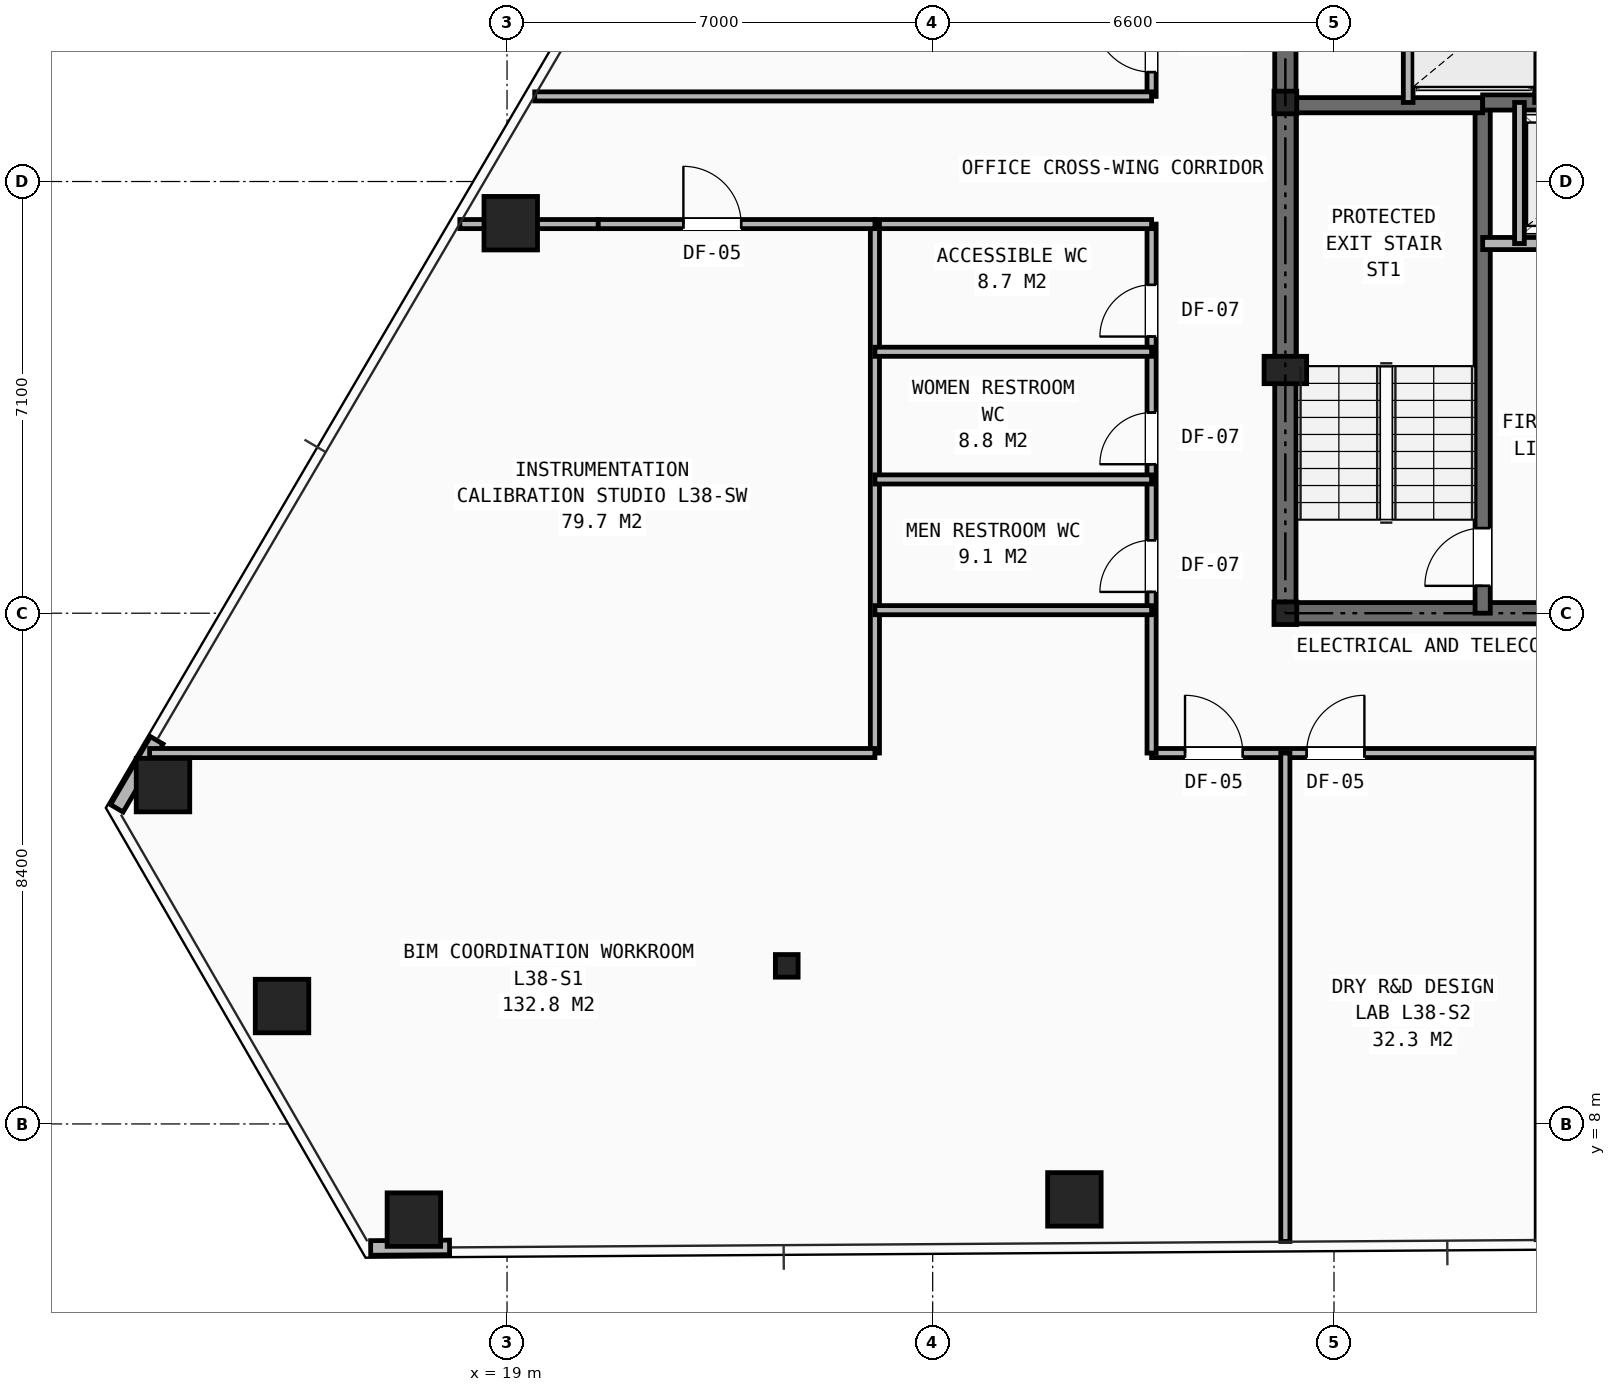
"""IFC4 building model, lengths in metres.
Left out: names, types, materials, properties, quantities, classifications, styles, units other than length and angle.
Written with IfcOpenShell. Run it as: python <this file> out.ifc"""

import sys

from ifc_helpers import new_model, si_unit, direction, frame, frame_2d, origin, origin_2d, place, context, subcontext, project, spatial, rectangle, hollow_rectangle, i_section, extrude, element, fill, save


model = new_model("IFC4")
c1 = context("Model", 3, precision=1e-05, world=origin(), true_north=direction((0.0, 1.0)))
c2 = subcontext(c1, "Body", "Model", "MODEL_VIEW")
j1 = project(units=[si_unit("LENGTHUNIT", "METRE"), si_unit("PLANEANGLEUNIT", "RADIAN")], contexts=[c1])
p1 = place(None, origin())
s1 = spatial("IfcSite", under=j1, at=p1, CompositionType="ELEMENT")
p2 = place(p1, origin())
s2 = spatial("IfcBuilding", under=s1, at=p2, CompositionType="ELEMENT")
p3 = place(p2, frame((0.0, 0.0, 133.25)))
s3 = spatial("IfcBuildingStorey", under=s2, at=p3, CompositionType="ELEMENT", Elevation=133.25)
for number, where, z_axis, x_axis in (
    (1, (31.8, 16.4, 0.0), (0.0, 0.0, 1.0), (1.0, 0.0, 0.0)),
    (2, (31.8, 24.8, 0.0), (0.0, 0.0, 1.0), (1.0, 0.0, 0.0)),
    (3, (23.6, 10.6, 0.0), (0.0, 0.0, 1.0), (1.0, 0.0, 0.0)),
):
    element("IfcColumn", number, at=place(p3, frame(where, z_axis=z_axis, x_axis=x_axis)), inside=s3, PredefinedType="COLUMN", context=c2, shape_type="SweptSolid", body=[
        extrude(i_section(OverallWidth=0.374, OverallDepth=0.372, WebThickness=0.016, FlangeThickness=0.026, at=origin_2d()), origin(), (0.0, 0.0, 1.0), 3.45),
    ])
p4 = place(p3, frame((31.8, 20.4, 0.0), z_axis=(0.0, 0.0, 1.0), x_axis=(1.0, 0.0, 0.0)))
e4 = element("IfcColumn", 4, at=p4, inside=s3, PredefinedType="PILASTER", context=c2, shape_type="SweptSolid", body=[
    extrude(rectangle(XDim=0.7, YDim=0.45, at=origin_2d()), origin(), (0.0, 0.0, 1.0), 3.45),
])
for number, where, z_axis, x_axis in (
    (5, (19.061, 22.814, 0.0), (0.0, 0.0, 1.0), (1.0, 0.0, 0.0)),
    (6, (13.342, 13.573, 0.0), (0.0, 0.0, 1.0), (1.0, 0.0, 0.0)),
    (7, (15.3, 9.939, 0.0), (0.0, 0.0, 1.0), (1.0, 0.0, 0.0)),
    (8, (17.468, 6.427, 0.0), (0.0, 0.0, 1.0), (1.0, 0.0, 0.0)),
    (9, (28.331, 6.759, 0.0), (0.0, 0.0, 1.0), (1.0, 0.0, 0.0)),
):
    element("IfcColumn", number, at=place(p3, frame(where, z_axis=z_axis, x_axis=x_axis)), inside=s3, PredefinedType="COLUMN", context=c2, shape_type="SweptSolid", body=[
        extrude(hollow_rectangle(XDim=0.88, YDim=0.88, WallThickness=0.06, at=origin_2d()), origin(), (0.0, 0.0, 1.0), 3.45),
    ])
for number, where, z_axis, x_axis in (
    (10, (13.239, 14.31, 0.0), (0.0, 0.0, 1.0), (-0.506, -0.863, 0.0)),
    (11, (16.757, 5.961, 0.0), (0.0, 0.0, 1.0), (1.0, 0.007, 0.0)),
):
    element("IfcWall", number, at=place(p3, frame(where, z_axis=z_axis, x_axis=x_axis)), inside=s3, PredefinedType="SHEAR", context=c2, shape_type="SweptSolid", body=[
        extrude(rectangle(XDim=1.298, YDim=0.24, at=frame_2d((0.649, 0.0))), origin(), (0.0, 0.0, 1.0), 2.583),
    ])
p5 = place(p3, frame((31.8, 16.4, 0.0), z_axis=(0.0, 0.0, 1.0), x_axis=(1.0, 0.0, 0.0)))
e12 = element("IfcWall", 12, at=p5, inside=s3, PredefinedType="SHEAR", context=c2, shape_type="SweptSolid", body=[
    extrude(rectangle(XDim=16.4, YDim=0.35, at=frame_2d((8.2, 0.0))), origin(), (0.0, 0.0, 1.0), 3.21),
])
p6 = place(p5, frame((7.75, 0.0, 0.0)))
e13 = element("IfcOpeningElement", 13, at=p6, cuts=e12, PredefinedType="OPENING", context=c2, shape_type="SweptSolid", body=[
    extrude(rectangle(XDim=0.9, YDim=2.1, at=frame_2d((0.45, 1.05))), frame((0.0, 0.185, 0.0), z_axis=(0.0, -1.0, 0.0), x_axis=(1.0, 0.0, 0.0)), (0.0, 0.0, 1.0), 0.37),
])
p7 = place(p5, frame((4.2, 0.0, 0.0)))
e14 = element("IfcOpeningElement", 14, at=p7, cuts=e12, PredefinedType="OPENING", context=c2, shape_type="SweptSolid", body=[
    extrude(rectangle(XDim=0.95, YDim=2.1, at=frame_2d((0.475, 1.05))), frame((0.0, 0.185, 0.0), z_axis=(0.0, -1.0, 0.0), x_axis=(1.0, 0.0, 0.0)), (0.0, 0.0, 1.0), 0.37),
])
p8 = place(p5, frame((10.6, 0.0, 0.0)))
e15 = element("IfcOpeningElement", 15, at=p8, cuts=e12, PredefinedType="OPENING", context=c2, shape_type="SweptSolid", body=[
    extrude(rectangle(XDim=0.95, YDim=2.1, at=frame_2d((0.475, 1.05))), frame((0.0, 0.185, 0.0), z_axis=(0.0, -1.0, 0.0), x_axis=(1.0, 0.0, 0.0)), (0.0, 0.0, 1.0), 0.37),
])
p9 = place(p3, frame((31.8, 16.4, 0.0), z_axis=(0.0, 0.0, 1.0), x_axis=(0.0, 1.0, 0.0)))
e16 = element("IfcWall", 16, at=p9, inside=s3, PredefinedType="SHEAR", context=c2, shape_type="SweptSolid", body=[
    extrude(rectangle(XDim=14.8, YDim=0.35, at=frame_2d((7.4, 0.0))), origin(), (0.0, 0.0, 1.0), 3.21),
])
p10 = place(p9, frame((11.0, 0.0, 0.0)))
e17 = element("IfcOpeningElement", 17, at=p10, cuts=e16, PredefinedType="OPENING", context=c2, shape_type="SweptSolid", body=[
    extrude(rectangle(XDim=1.1, YDim=2.15, at=frame_2d((0.55, 1.075))), frame((0.0, 0.185, 0.0), z_axis=(0.0, -1.0, 0.0), x_axis=(1.0, 0.0, 0.0)), (0.0, 0.0, 1.0), 0.37),
])
p11 = place(p3, frame((35.045, 16.4, 0.0), z_axis=(0.0, 0.0, 1.0), x_axis=(0.0, 1.0, 0.0)))
e18 = element("IfcWall", 18, at=p11, inside=s3, PredefinedType="SHEAR", context=c2, shape_type="SweptSolid", body=[
    extrude(rectangle(XDim=8.4, YDim=0.25, at=frame_2d((4.2, 0.0))), origin(), (0.0, 0.0, 1.0), 3.21),
])
p12 = place(p11, frame((0.45, 0.0, 0.0)))
e19 = element("IfcOpeningElement", 19, at=p12, cuts=e18, PredefinedType="OPENING", context=c2, shape_type="SweptSolid", body=[
    extrude(rectangle(XDim=0.95, YDim=2.1, at=frame_2d((0.475, 1.05))), frame((0.0, 0.135, 0.0), z_axis=(0.0, -1.0, 0.0), x_axis=(1.0, 0.0, 0.0)), (0.0, 0.0, 1.0), 0.27),
])
p13 = place(p3, frame((31.8, 24.755, 0.0), z_axis=(0.0, 0.0, 1.0), x_axis=(1.0, 0.0, 0.0)))
e20 = element("IfcWall", 20, at=p13, inside=s3, PredefinedType="SHEAR", context=c2, shape_type="SweptSolid", body=[
    extrude(rectangle(XDim=3.245, YDim=0.25, at=frame_2d((1.623, 0.0))), origin(), (0.0, 0.0, 1.0), 3.21),
])
p14 = place(p3, frame((35.045, 24.8, 0.0), z_axis=(0.0, 0.0, 1.0), x_axis=(1.0, 0.0, 0.0)))
e21 = element("IfcWall", 21, at=p14, inside=s3, PredefinedType="SHEAR", context=c2, shape_type="SweptSolid", body=[
    extrude(rectangle(XDim=9.91, YDim=0.25, at=frame_2d((4.955, 0.0))), origin(), (0.0, 0.0, 1.0), 3.21),
])
p15 = place(p3, frame((35.045, 22.48, 0.0), z_axis=(0.0, 0.0, 1.0), x_axis=(1.0, 0.0, 0.0)))
e22 = element("IfcWall", 22, at=p15, inside=s3, PredefinedType="SOLIDWALL", context=c2, shape_type="SweptSolid", body=[
    extrude(rectangle(XDim=9.91, YDim=0.2, at=frame_2d((4.955, 0.0))), origin(), (0.0, 0.0, 1.0), 3.21),
])
p16 = place(p15, frame((1.255, 0.0, 0.0)))
e23 = element("IfcOpeningElement", 23, at=p16, cuts=e22, PredefinedType="OPENING", context=c2, shape_type="SweptSolid", body=[
    extrude(rectangle(XDim=1.1, YDim=2.15, at=frame_2d((0.55, 1.075))), frame((0.0, 0.11, 0.0), z_axis=(0.0, -1.0, 0.0), x_axis=(1.0, 0.0, 0.0)), (0.0, 0.0, 1.0), 0.22),
])
p17 = place(p15, frame((7.555, 0.0, 0.0)))
e24 = element("IfcOpeningElement", 24, at=p17, cuts=e22, PredefinedType="OPENING", context=c2, shape_type="SweptSolid", body=[
    extrude(rectangle(XDim=1.1, YDim=2.15, at=frame_2d((0.55, 1.075))), frame((0.0, 0.11, 0.0), z_axis=(0.0, -1.0, 0.0), x_axis=(1.0, 0.0, 0.0)), (0.0, 0.0, 1.0), 0.22),
])
p18 = place(p15, frame((4.405, 0.0, 0.0)))
e25 = element("IfcOpeningElement", 25, at=p18, cuts=e22, PredefinedType="OPENING", context=c2, shape_type="SweptSolid", body=[
    extrude(rectangle(XDim=1.1, YDim=2.15, at=frame_2d((0.55, 1.075))), frame((0.0, 0.11, 0.0), z_axis=(0.0, -1.0, 0.0), x_axis=(1.0, 0.0, 0.0)), (0.0, 0.0, 1.0), 0.22),
])
p19 = place(p3, frame((35.65, 22.48, 0.0), z_axis=(0.0, 0.0, 1.0), x_axis=(0.0, 1.0, 0.0)))
e26 = element("IfcWall", 26, at=p19, inside=s3, PredefinedType="SOLIDWALL", context=c2, shape_type="SweptSolid", body=[
    extrude(rectangle(XDim=2.32, YDim=0.16, at=frame_2d((1.16, 0.0))), origin(), (0.0, 0.0, 1.0), 3.21),
])
for number, where, z_axis, x_axis in (
    (27, (33.82, 24.8, 0.0), (0.0, 0.0, 1.0), (0.0, 1.0, 0.0)),
    (28, (35.98, 24.8, 0.0), (0.0, 0.0, 1.0), (0.0, 1.0, 0.0)),
):
    element("IfcWall", number, at=place(p3, frame(where, z_axis=z_axis, x_axis=x_axis)), inside=s3, PredefinedType="SOLIDWALL", context=c2, shape_type="SweptSolid", body=[
        extrude(rectangle(XDim=2.08, YDim=0.16, at=frame_2d((1.04, 0.0))), origin(), (0.0, 0.0, 1.0), 3.21),
    ])
p20 = place(p3, frame((29.6, 14.1, 0.0), z_axis=(0.0, 0.0, 1.0), x_axis=(1.0, 0.0, 0.0)))
e29 = element("IfcWall", 29, at=p20, inside=s3, PredefinedType="PARTITIONING", context=c2, shape_type="SweptSolid", body=[
    extrude(rectangle(XDim=18.6, YDim=0.15, at=frame_2d((9.3, 0.0))), origin(), (0.0, 0.0, 1.0), 2.252),
])
p21 = place(p20, frame((0.55, 0.0, 0.0)))
e30 = element("IfcOpeningElement", 30, at=p21, cuts=e29, PredefinedType="OPENING", context=c2, shape_type="SweptSolid", body=[
    extrude(rectangle(XDim=0.95, YDim=2.1, at=frame_2d((0.475, 1.05))), frame((0.0, 0.085, 0.0), z_axis=(0.0, -1.0, 0.0), x_axis=(1.0, 0.0, 0.0)), (0.0, 0.0, 1.0), 0.17),
])
p22 = place(p20, frame((2.55, 0.0, 0.0)))
e31 = element("IfcOpeningElement", 31, at=p22, cuts=e29, PredefinedType="OPENING", context=c2, shape_type="SweptSolid", body=[
    extrude(rectangle(XDim=0.95, YDim=2.1, at=frame_2d((0.475, 1.05))), frame((0.0, 0.085, 0.0), z_axis=(0.0, -1.0, 0.0), x_axis=(1.0, 0.0, 0.0)), (0.0, 0.0, 1.0), 0.17),
])
p23 = place(p20, frame((6.75, 0.0, 0.0)))
e32 = element("IfcOpeningElement", 32, at=p23, cuts=e29, PredefinedType="OPENING", context=c2, shape_type="SweptSolid", body=[
    extrude(rectangle(XDim=0.95, YDim=2.1, at=frame_2d((0.475, 1.05))), frame((0.0, 0.085, 0.0), z_axis=(0.0, -1.0, 0.0), x_axis=(1.0, 0.0, 0.0)), (0.0, 0.0, 1.0), 0.17),
])
p24 = place(p20, frame((10.95, 0.0, 0.0)))
e33 = element("IfcOpeningElement", 33, at=p24, cuts=e29, PredefinedType="OPENING", context=c2, shape_type="SweptSolid", body=[
    extrude(rectangle(XDim=0.95, YDim=2.1, at=frame_2d((0.475, 1.05))), frame((0.0, 0.085, 0.0), z_axis=(0.0, -1.0, 0.0), x_axis=(1.0, 0.0, 0.0)), (0.0, 0.0, 1.0), 0.17),
])
p25 = place(p20, frame((15.15, 0.0, 0.0)))
e34 = element("IfcOpeningElement", 34, at=p25, cuts=e29, PredefinedType="OPENING", context=c2, shape_type="SweptSolid", body=[
    extrude(rectangle(XDim=0.95, YDim=2.1, at=frame_2d((0.475, 1.05))), frame((0.0, 0.085, 0.0), z_axis=(0.0, -1.0, 0.0), x_axis=(1.0, 0.0, 0.0)), (0.0, 0.0, 1.0), 0.17),
])
p26 = place(p3, frame((29.6, 14.1, 0.0), z_axis=(0.0, 0.0, 1.0), x_axis=(0.0, 1.0, 0.0)))
e35 = element("IfcWall", 35, at=p26, inside=s3, PredefinedType="PARTITIONING", context=c2, shape_type="SweptSolid", body=[
    extrude(rectangle(XDim=8.7, YDim=0.15, at=frame_2d((4.35, 0.0))), origin(), (0.0, 0.0, 1.0), 3.21),
])
p27 = place(p26, frame((2.65, 0.0, 0.0)))
e36 = element("IfcOpeningElement", 36, at=p27, cuts=e35, PredefinedType="OPENING", context=c2, shape_type="SweptSolid", body=[
    extrude(rectangle(XDim=0.85, YDim=2.05, at=frame_2d((0.425, 1.025))), frame((0.0, 0.085, 0.0), z_axis=(0.0, -1.0, 0.0), x_axis=(1.0, 0.0, 0.0)), (0.0, 0.0, 1.0), 0.17),
])
p28 = place(p26, frame((4.75, 0.0, 0.0)))
e37 = element("IfcOpeningElement", 37, at=p28, cuts=e35, PredefinedType="OPENING", context=c2, shape_type="SweptSolid", body=[
    extrude(rectangle(XDim=0.85, YDim=2.05, at=frame_2d((0.425, 1.025))), frame((0.0, 0.085, 0.0), z_axis=(0.0, -1.0, 0.0), x_axis=(1.0, 0.0, 0.0)), (0.0, 0.0, 1.0), 0.17),
])
p29 = place(p26, frame((6.85, 0.0, 0.0)))
e38 = element("IfcOpeningElement", 38, at=p29, cuts=e35, PredefinedType="OPENING", context=c2, shape_type="SweptSolid", body=[
    extrude(rectangle(XDim=0.85, YDim=2.05, at=frame_2d((0.425, 1.025))), frame((0.0, 0.085, 0.0), z_axis=(0.0, -1.0, 0.0), x_axis=(1.0, 0.0, 0.0)), (0.0, 0.0, 1.0), 0.17),
])
p30 = place(p3, frame((29.6, 24.9, 0.0), z_axis=(0.0, 0.0, 1.0), x_axis=(0.0, 1.0, 0.0)))
e39 = element("IfcWall", 39, at=p30, inside=s3, PredefinedType="PARTITIONING", context=c2, shape_type="SweptSolid", body=[
    extrude(rectangle(XDim=13.9, YDim=0.15, at=frame_2d((6.95, 0.0))), origin(), (0.0, 0.0, 1.0), 2.252),
])
p31 = place(p30, frame((0.4, 0.0, 0.0)))
e40 = element("IfcOpeningElement", 40, at=p31, cuts=e39, PredefinedType="OPENING", context=c2, shape_type="SweptSolid", body=[
    extrude(rectangle(XDim=0.95, YDim=2.1, at=frame_2d((0.475, 1.05))), frame((0.0, 0.085, 0.0), z_axis=(0.0, -1.0, 0.0), x_axis=(1.0, 0.0, 0.0)), (0.0, 0.0, 1.0), 0.17),
])
p32 = place(p30, frame((4.0, 0.0, 0.0)))
e41 = element("IfcOpeningElement", 41, at=p32, cuts=e39, PredefinedType="OPENING", context=c2, shape_type="SweptSolid", body=[
    extrude(rectangle(XDim=0.95, YDim=2.1, at=frame_2d((0.475, 1.05))), frame((0.0, 0.085, 0.0), z_axis=(0.0, -1.0, 0.0), x_axis=(1.0, 0.0, 0.0)), (0.0, 0.0, 1.0), 0.17),
])
p33 = place(p30, frame((8.5, 0.0, 0.0)))
e42 = element("IfcOpeningElement", 42, at=p33, cuts=e39, PredefinedType="OPENING", context=c2, shape_type="SweptSolid", body=[
    extrude(rectangle(XDim=0.95, YDim=2.1, at=frame_2d((0.475, 1.05))), frame((0.0, 0.085, 0.0), z_axis=(0.0, -1.0, 0.0), x_axis=(1.0, 0.0, 0.0)), (0.0, 0.0, 1.0), 0.17),
])
p34 = place(p3, frame((18.224, 22.8, 0.0), z_axis=(0.0, 0.0, 1.0), x_axis=(1.0, 0.0, 0.0)))
e43 = element("IfcWall", 43, at=p34, inside=s3, PredefinedType="PARTITIONING", context=c2, shape_type="SweptSolid", body=[
    extrude(rectangle(XDim=2.276, YDim=0.15, at=frame_2d((1.138, 0.0))), origin(), (0.0, 0.0, 1.0), 2.589),
])
p35 = place(p3, frame((25.05, 22.8, 0.0), z_axis=(0.0, 0.0, 1.0), x_axis=(1.0, 0.0, 0.0)))
e44 = element("IfcWall", 44, at=p35, inside=s3, PredefinedType="PARTITIONING", context=c2, shape_type="SweptSolid", body=[
    extrude(rectangle(XDim=4.55, YDim=0.15, at=frame_2d((2.275, 0.0))), origin(), (0.0, 0.0, 1.0), 3.21),
])
p36 = place(p3, frame((19.455, 24.9, 0.0), z_axis=(0.0, 0.0, 1.0), x_axis=(1.0, 0.0, 0.0)))
e45 = element("IfcWall", 45, at=p36, inside=s3, PredefinedType="PARTITIONING", context=c2, shape_type="SweptSolid", body=[
    extrude(rectangle(XDim=10.145, YDim=0.15, at=frame_2d((5.073, 0.0))), origin(), (0.0, 0.0, 1.0), 2.589),
])
p37 = place(p3, frame((25.05, 14.1, 0.0), z_axis=(0.0, 0.0, 1.0), x_axis=(0.0, 1.0, 0.0)))
e46 = element("IfcWall", 46, at=p37, inside=s3, PredefinedType="PARTITIONING", context=c2, shape_type="SweptSolid", body=[
    extrude(rectangle(XDim=8.7, YDim=0.15, at=frame_2d((4.35, 0.0))), origin(), (0.0, 0.0, 1.0), 3.21),
])
for number, where, z_axis, x_axis in (
    (47, (25.05, 16.45, 0.0), (0.0, 0.0, 1.0), (1.0, 0.0, 0.0)),
    (48, (25.05, 18.6, 0.0), (0.0, 0.0, 1.0), (1.0, 0.0, 0.0)),
    (49, (25.05, 20.7, 0.0), (0.0, 0.0, 1.0), (1.0, 0.0, 0.0)),
):
    element("IfcWall", number, at=place(p3, frame(where, z_axis=z_axis, x_axis=x_axis)), inside=s3, PredefinedType="PARTITIONING", context=c2, shape_type="SweptSolid", body=[
        extrude(rectangle(XDim=4.55, YDim=0.15, at=frame_2d((2.275, 0.0))), origin(), (0.0, 0.0, 1.0), 3.21),
    ])
p38 = place(p3, frame((31.8, 6.068, 0.0), z_axis=(0.0, 0.0, 1.0), x_axis=(0.0, 1.0, 0.0)))
e50 = element("IfcWall", 50, at=p38, inside=s3, PredefinedType="PARTITIONING", context=c2, shape_type="SweptSolid", body=[
    extrude(rectangle(XDim=8.032, YDim=0.15, at=frame_2d((4.016, 0.0))), origin(), (0.0, 0.0, 1.0), 2.589),
])
p39 = place(p3, frame((13.122, 14.1, 0.0), z_axis=(0.0, 0.0, 1.0), x_axis=(1.0, 0.0, 0.0)))
e51 = element("IfcWall", 51, at=p39, inside=s3, PredefinedType="PARTITIONING", context=c2, shape_type="SweptSolid", body=[
    extrude(rectangle(XDim=11.928, YDim=0.15, at=frame_2d((5.964, 0.0))), origin(), (0.0, 0.0, 1.0), 2.589),
])
p40 = place(p3, frame((20.5, 22.8, 0.0), z_axis=(0.0, 0.0, 1.0), x_axis=(1.0, 0.0, 0.0)))
e52 = element("IfcWall", 52, at=p40, inside=s3, PredefinedType="PARTITIONING", context=c2, shape_type="SweptSolid", body=[
    extrude(rectangle(XDim=4.55, YDim=0.15, at=frame_2d((2.275, 0.0))), origin(), (0.0, 0.0, 1.0), 3.21),
])
p41 = place(p40, frame((1.4, 0.0, 0.0)))
e53 = element("IfcOpeningElement", 53, at=p41, cuts=e52, PredefinedType="OPENING", context=c2, shape_type="SweptSolid", body=[
    extrude(rectangle(XDim=0.95, YDim=2.1, at=frame_2d((0.475, 1.05))), frame((0.0, 0.085, 0.0), z_axis=(0.0, -1.0, 0.0), x_axis=(1.0, 0.0, 0.0)), (0.0, 0.0, 1.0), 0.17),
])
p42 = place(p12, origin())
e54 = element("IfcDoor", 54, at=p42, inside=s3, OperationType="SINGLE_SWING_LEFT", PredefinedType="DOOR", context=c2, shape_type="SweptSolid", body=[
    extrude(rectangle(XDim=0.95, YDim=2.1, at=frame_2d((0.475, 1.05))), frame((0.0, 0.025, 0.0), z_axis=(0.0, -1.0, 0.0), x_axis=(1.0, 0.0, 0.0)), (0.0, 0.0, 1.0), 0.05),
])
fill(e19, e54)
p43 = place(p27, origin())
e55 = element("IfcDoor", 55, at=p43, inside=s3, OperationType="SINGLE_SWING_LEFT", PredefinedType="DOOR", context=c2, shape_type="SweptSolid", body=[
    extrude(rectangle(XDim=0.85, YDim=2.05, at=frame_2d((0.425, 1.025))), frame((0.0, 0.025, 0.0), z_axis=(0.0, -1.0, 0.0), x_axis=(1.0, 0.0, 0.0)), (0.0, 0.0, 1.0), 0.05),
])
fill(e36, e55)
p44 = place(p28, origin())
e56 = element("IfcDoor", 56, at=p44, inside=s3, OperationType="SINGLE_SWING_LEFT", PredefinedType="DOOR", context=c2, shape_type="SweptSolid", body=[
    extrude(rectangle(XDim=0.85, YDim=2.05, at=frame_2d((0.425, 1.025))), frame((0.0, 0.025, 0.0), z_axis=(0.0, -1.0, 0.0), x_axis=(1.0, 0.0, 0.0)), (0.0, 0.0, 1.0), 0.05),
])
fill(e37, e56)
p45 = place(p29, origin())
e57 = element("IfcDoor", 57, at=p45, inside=s3, OperationType="SINGLE_SWING_LEFT", PredefinedType="DOOR", context=c2, shape_type="SweptSolid", body=[
    extrude(rectangle(XDim=0.85, YDim=2.05, at=frame_2d((0.425, 1.025))), frame((0.0, 0.025, 0.0), z_axis=(0.0, -1.0, 0.0), x_axis=(1.0, 0.0, 0.0)), (0.0, 0.0, 1.0), 0.05),
])
fill(e38, e57)
p46 = place(p21, origin())
e58 = element("IfcDoor", 58, at=p46, inside=s3, OperationType="SINGLE_SWING_LEFT", PredefinedType="DOOR", context=c2, shape_type="SweptSolid", body=[
    extrude(rectangle(XDim=0.95, YDim=2.1, at=frame_2d((0.475, 1.05))), frame((0.0, 0.025, 0.0), z_axis=(0.0, -1.0, 0.0), x_axis=(1.0, 0.0, 0.0)), (0.0, 0.0, 1.0), 0.05),
])
fill(e30, e58)
p47 = place(p22, origin())
e59 = element("IfcDoor", 59, at=p47, inside=s3, OperationType="SINGLE_SWING_RIGHT", PredefinedType="DOOR", context=c2, shape_type="SweptSolid", body=[
    extrude(rectangle(XDim=0.95, YDim=2.1, at=frame_2d((0.475, 1.05))), frame((0.0, 0.025, 0.0), z_axis=(0.0, -1.0, 0.0), x_axis=(1.0, 0.0, 0.0)), (0.0, 0.0, 1.0), 0.05),
])
fill(e31, e59)
p48 = place(p41, origin())
e60 = element("IfcDoor", 60, at=p48, inside=s3, OperationType="SINGLE_SWING_LEFT", PredefinedType="DOOR", context=c2, shape_type="SweptSolid", body=[
    extrude(rectangle(XDim=0.95, YDim=2.1, at=frame_2d((0.475, 1.05))), frame((0.0, 0.025, 0.0), z_axis=(0.0, -1.0, 0.0), x_axis=(1.0, 0.0, 0.0)), (0.0, 0.0, 1.0), 0.05),
])
fill(e53, e60)
p49 = place(p31, origin())
e61 = element("IfcDoor", 61, at=p49, inside=s3, OperationType="SINGLE_SWING_RIGHT", PredefinedType="DOOR", context=c2, shape_type="SweptSolid", body=[
    extrude(rectangle(XDim=0.95, YDim=2.1, at=frame_2d((0.475, 1.05))), frame((0.0, 0.025, 0.0), z_axis=(0.0, -1.0, 0.0), x_axis=(1.0, 0.0, 0.0)), (0.0, 0.0, 1.0), 0.05),
])
fill(e40, e61)
save(model, sys.argv[1])
